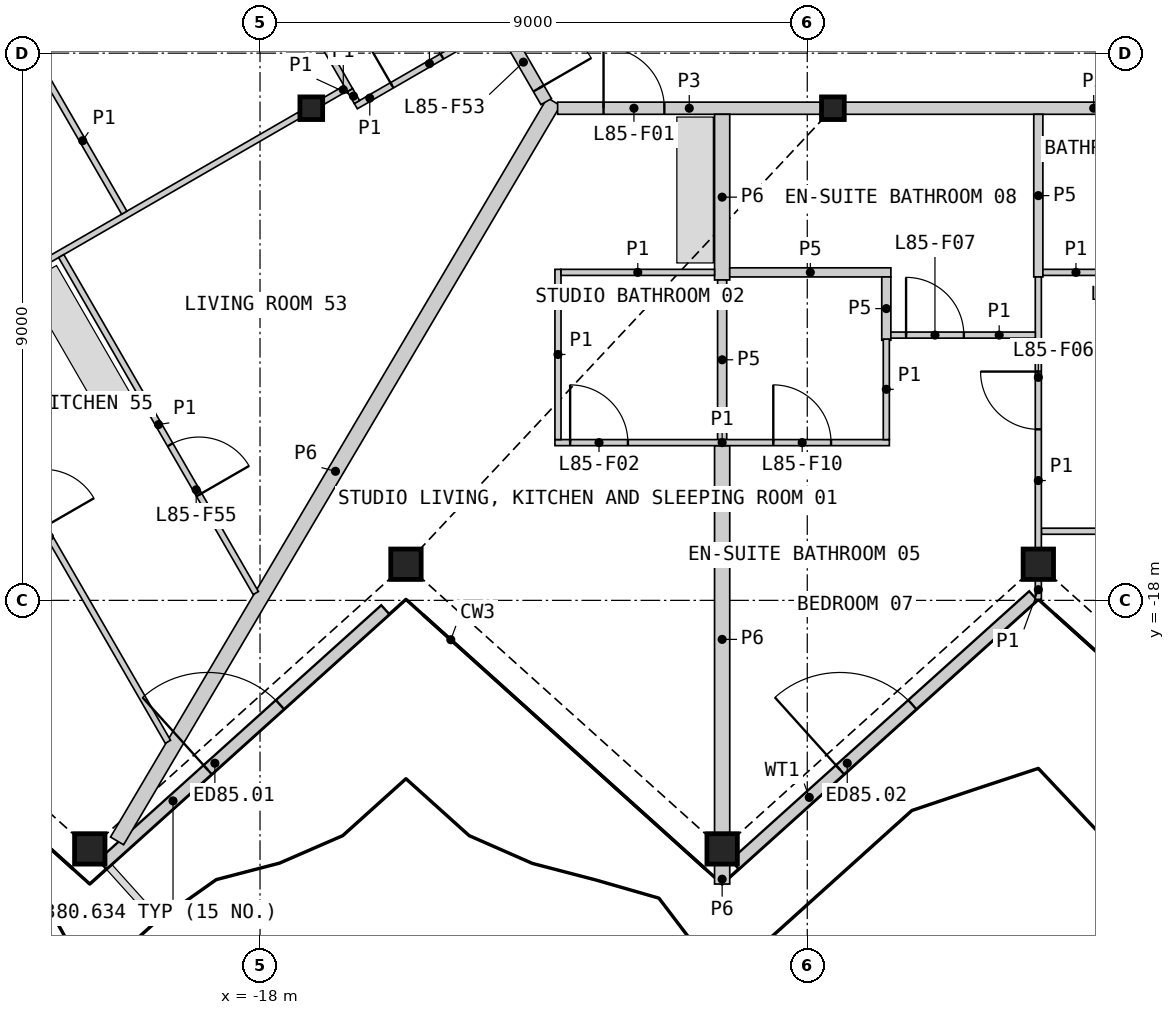
"""IFC4 building model, lengths in metres.
Left out: names, types, materials, properties, quantities, classifications, styles, units other than length and angle.
Written with IfcOpenShell. Run it as: python <this file> out.ifc"""

import sys

from ifc_helpers import new_model, si_unit, direction, frame, frame_2d, origin, origin_2d, place, context, subcontext, project, spatial, rectangle, hollow_rectangle, i_section, extrude, element, fill, save


model = new_model("IFC4")
c1 = context("Model", 3, precision=1e-05, world=origin(), true_north=direction((0.0, 1.0)))
c2 = subcontext(c1, "Body", "Model", "MODEL_VIEW")
j1 = project(units=[si_unit("LENGTHUNIT", "METRE"), si_unit("PLANEANGLEUNIT", "RADIAN")], contexts=[c1])
p1 = place(None, origin())
s1 = spatial("IfcSite", under=j1, at=p1, CompositionType="ELEMENT")
p2 = place(p1, origin())
s2 = spatial("IfcBuilding", under=s1, at=p2, CompositionType="ELEMENT")
p3 = place(p2, frame((0.0, 0.0, 378.0)))
s3 = spatial("IfcBuildingStorey", under=s2, at=p3, CompositionType="ELEMENT", Elevation=378.0)
for number, where, z_axis, x_axis in (
    (1, (-20.8, -22.088, 0.0), (0.0, 0.0, 1.0), (1.0, 0.0, 0.0)),
    (2, (-15.6, -17.406, 0.0), (0.0, 0.0, 1.0), (1.0, 0.0, 0.0)),
    (3, (-10.4, -22.088, 0.0), (0.0, 0.0, 1.0), (1.0, 0.0, 0.0)),
    (4, (-5.2, -17.406, 0.0), (0.0, 0.0, 1.0), (1.0, 0.0, 0.0)),
):
    element("IfcColumn", number, at=place(p3, frame(where, z_axis=z_axis, x_axis=x_axis)), inside=s3, PredefinedType="COLUMN", context=c2, shape_type="SweptSolid", body=[
        extrude(hollow_rectangle(XDim=0.5, YDim=0.5, WallThickness=0.03, at=origin_2d()), origin(), (0.0, 0.0, 1.0), 3.4),
    ])
for number, where, z_axis, x_axis in (
    (5, (-17.157, -9.906, 0.0), (0.0, 0.0, 1.0), (1.0, 0.0, 0.0)),
    (6, (-8.578, -9.906, 0.0), (0.0, 0.0, 1.0), (1.0, 0.0, 0.0)),
):
    element("IfcColumn", number, at=place(p3, frame(where, z_axis=z_axis, x_axis=x_axis)), inside=s3, PredefinedType="COLUMN", context=c2, shape_type="SweptSolid", body=[
        extrude(i_section(OverallWidth=0.374, OverallDepth=0.372, WebThickness=0.016, FlangeThickness=0.026, at=origin_2d()), origin(), (0.0, 0.0, 1.0), 3.4),
    ])
p4 = place(p3, frame((-20.595, -22.346, 0.0), z_axis=(0.0, 0.0, 1.0), x_axis=(0.743137181878, 0.669139095339, 0.0)))
e7 = element("IfcWall", 7, at=p4, inside=s3, PredefinedType="SOLIDWALL", context=c2, shape_type="SweptSolid", body=[
    extrude(rectangle(XDim=6.265, YDim=0.2, at=frame_2d((3.133, 0.0))), origin(), (0.0, 0.0, 1.0), 2.634),
])
p5 = place(p4, frame((2.333, 0.0, 0.0)))
e8 = element("IfcOpeningElement", 8, at=p5, cuts=e7, PredefinedType="OPENING", context=c2, shape_type="SweptSolid", body=[
    extrude(rectangle(XDim=1.6, YDim=2.25, at=frame_2d((0.8, 1.125))), frame((0.0, 0.11, 0.0), z_axis=(0.0, -1.0, 0.0), x_axis=(1.0, 0.0, 0.0)), (0.0, 0.0, 1.0), 0.22),
])
p6 = place(p3, frame((-10.195, -22.346, 0.0), z_axis=(0.0, 0.0, 1.0), x_axis=(0.74313432117, 0.66914227239, 0.0)))
e9 = element("IfcWall", 9, at=p6, inside=s3, PredefinedType="SOLIDWALL", context=c2, shape_type="SweptSolid", body=[
    extrude(rectangle(XDim=6.609, YDim=0.2, at=frame_2d((3.304, 0.0))), origin(), (0.0, 0.0, 1.0), 2.634),
])
p7 = place(p6, frame((2.333, 0.0, 0.0)))
e10 = element("IfcOpeningElement", 10, at=p7, cuts=e9, PredefinedType="OPENING", context=c2, shape_type="SweptSolid", body=[
    extrude(rectangle(XDim=1.6, YDim=2.25, at=frame_2d((0.8, 1.125))), frame((0.0, 0.11, 0.0), z_axis=(0.0, -1.0, 0.0), x_axis=(1.0, 0.0, 0.0)), (0.0, 0.0, 1.0), 0.22),
])
p8 = place(p3, frame((-20.351, -21.956, 0.0), z_axis=(0.0, 0.0, 1.0), x_axis=(0.508713003719, 0.860936164793, 0.0)))
e11 = element("IfcWall", 11, at=p8, inside=s3, PredefinedType="PARTITIONING", context=c2, shape_type="SweptSolid", body=[
    extrude(rectangle(XDim=14.122, YDim=0.25, at=frame_2d((7.061, 0.0))), origin(), (0.0, 0.0, 1.0), 2.33),
])
p9 = place(p3, frame((-8.382, -9.906, 0.0), z_axis=(0.0, 0.0, 1.0), x_axis=(1.0, 0.0, 0.0)))
e12 = element("IfcWall", 12, at=p9, inside=s3, PredefinedType="PARTITIONING", context=c2, shape_type="SweptSolid", body=[
    extrude(rectangle(XDim=8.185, YDim=0.2, at=frame_2d((4.092, 0.0))), origin(), (0.0, 0.0, 1.0), 3.1),
])
p10 = place(p9, frame((6.023, 0.0, 0.0)))
e13 = element("IfcOpeningElement", 13, at=p10, cuts=e12, PredefinedType="OPENING", context=c2, shape_type="SweptSolid", body=[
    extrude(rectangle(XDim=1.0, YDim=2.1, at=frame_2d((0.5, 1.05))), frame((0.0, 0.11, 0.0), z_axis=(0.0, -1.0, 0.0), x_axis=(1.0, 0.0, 0.0)), (0.0, 0.0, 1.0), 0.22),
])
p11 = place(p3, frame((-10.4, -21.828, 0.0), z_axis=(0.0, 0.0, 1.0), x_axis=(0.0, 1.0, 0.0)))
e14 = element("IfcWall", 14, at=p11, inside=s3, PredefinedType="PARTITIONING", context=c2, shape_type="SweptSolid", body=[
    extrude(rectangle(XDim=6.372, YDim=0.25, at=frame_2d((3.186, 0.0))), origin(), (0.0, 0.0, 1.0), 2.33),
])
p12 = place(p3, frame((-13.106, -9.906, 0.0), z_axis=(0.0, 0.0, 1.0), x_axis=(1.0, 0.0, 0.0)))
e15 = element("IfcWall", 15, at=p12, inside=s3, PredefinedType="PARTITIONING", context=c2, shape_type="SweptSolid", body=[
    extrude(rectangle(XDim=4.331, YDim=0.2, at=frame_2d((2.165, 0.0))), origin(), (0.0, 0.0, 1.0), 3.1),
])
p13 = place(p12, frame((0.755, 0.0, 0.0)))
e16 = element("IfcOpeningElement", 16, at=p13, cuts=e15, PredefinedType="OPENING", context=c2, shape_type="SweptSolid", body=[
    extrude(rectangle(XDim=1.0, YDim=2.1, at=frame_2d((0.5, 1.05))), frame((0.0, 0.11, 0.0), z_axis=(0.0, -1.0, 0.0), x_axis=(1.0, 0.0, 0.0)), (0.0, 0.0, 1.0), 0.22),
])
p14 = place(p3, frame((-15.131, -6.614, 0.0), z_axis=(0.0, 0.0, 1.0), x_axis=(0.499967746641, -0.866044024469, 0.0)))
e17 = element("IfcWall", 17, at=p14, inside=s3, PredefinedType="PARTITIONING", context=c2, shape_type="SweptSolid", body=[
    extrude(rectangle(XDim=3.676, YDim=0.2, at=frame_2d((1.838, 0.0))), origin(), (0.0, 0.0, 1.0), 3.1),
])
p15 = place(p14, frame((2.426, 0.0, 0.0)))
e18 = element("IfcOpeningElement", 18, at=p15, cuts=e17, PredefinedType="OPENING", context=c2, shape_type="SweptSolid", body=[
    extrude(rectangle(XDim=1.0, YDim=2.1, at=frame_2d((0.5, 1.05))), frame((0.0, 0.11, 0.0), z_axis=(0.0, -1.0, 0.0), x_axis=(1.0, 0.0, 0.0)), (0.0, 0.0, 1.0), 0.22),
])
p16 = place(p3, frame((-10.4, -12.731, 0.0), z_axis=(0.0, 0.0, 1.0), x_axis=(0.0, 1.0, 0.0)))
e19 = element("IfcWall", 19, at=p16, inside=s3, PredefinedType="PARTITIONING", context=c2, shape_type="SweptSolid", body=[
    extrude(rectangle(XDim=2.725, YDim=0.25, at=frame_2d((1.363, 0.0))), origin(), (0.0, 0.0, 1.0), 2.33),
])
p17 = place(p3, frame((-10.4, -22.666, 0.0), z_axis=(0.0, 0.0, 1.0), x_axis=(0.0, 1.0, 0.0)))
e20 = element("IfcWall", 20, at=p17, inside=s3, PredefinedType="PARTITIONING", context=c2, shape_type="SweptSolid", body=[
    extrude(rectangle(XDim=0.318, YDim=0.25, at=frame_2d((0.159, 0.0))), origin(), (0.0, 0.0, 1.0), 2.33),
])
p18 = place(p3, frame((-10.4, -15.356, 0.0), z_axis=(0.0, 0.0, 1.0), x_axis=(0.0, 1.0, 0.0)))
e21 = element("IfcWall", 21, at=p18, inside=s3, PredefinedType="PLUMBINGWALL", context=c2, shape_type="SweptSolid", body=[
    extrude(rectangle(XDim=2.625, YDim=0.15, at=frame_2d((1.312, 0.0))), origin(), (0.0, 0.0, 1.0), 2.33),
])
p19 = place(p3, frame((-5.2, -12.681, 0.0), z_axis=(0.0, 0.0, 1.0), x_axis=(0.0, 1.0, 0.0)))
e22 = element("IfcWall", 22, at=p19, inside=s3, PredefinedType="PLUMBINGWALL", context=c2, shape_type="SweptSolid", body=[
    extrude(rectangle(XDim=2.675, YDim=0.15, at=frame_2d((1.337, 0.0))), origin(), (0.0, 0.0, 1.0), 2.33),
])
p20 = place(p3, frame((-10.275, -12.606, 0.0), z_axis=(0.0, 0.0, 1.0), x_axis=(1.0, 0.0, 0.0)))
e23 = element("IfcWall", 23, at=p20, inside=s3, PredefinedType="PLUMBINGWALL", context=c2, shape_type="SweptSolid", body=[
    extrude(rectangle(XDim=2.65, YDim=0.15, at=frame_2d((1.325, 0.0))), origin(), (0.0, 0.0, 1.0), 2.33),
])
p21 = place(p3, frame((-7.7, -13.722, 0.0), z_axis=(0.0, 0.0, 1.0), x_axis=(0.0, 1.0, 0.0)))
e24 = element("IfcWall", 24, at=p21, inside=s3, PredefinedType="PLUMBINGWALL", context=c2, shape_type="SweptSolid", body=[
    extrude(rectangle(XDim=1.042, YDim=0.15, at=frame_2d((0.521, 0.0))), origin(), (0.0, 0.0, 1.0), 2.33),
])
p22 = place(p3, frame((-26.777, -15.46, 0.0), z_axis=(0.0, 0.0, 1.0), x_axis=(0.866019680922, 0.500009912158, 0.0)))
e25 = element("IfcWall", 25, at=p22, inside=s3, PredefinedType="PARTITIONING", context=c2, shape_type="SweptSolid", body=[
    extrude(rectangle(XDim=10.881, YDim=0.1, at=frame_2d((5.44, 0.0))), origin(), (0.0, 0.0, 1.0), 2.33),
])
p23 = place(p22, frame((1.454, 0.0, 0.0)))
e26 = element("IfcOpeningElement", 26, at=p23, cuts=e25, PredefinedType="OPENING", context=c2, shape_type="SweptSolid", body=[
    extrude(rectangle(XDim=0.95, YDim=2.1, at=frame_2d((0.475, 1.05))), frame((0.0, 0.06, 0.0), z_axis=(0.0, -1.0, 0.0), x_axis=(1.0, 0.0, 0.0)), (0.0, 0.0, 1.0), 0.12),
])
p24 = place(p3, frame((-23.413, -13.575, 0.0), z_axis=(0.0, 0.0, 1.0), x_axis=(0.499998958472, -0.86602600511, 0.0)))
e27 = element("IfcWall", 27, at=p24, inside=s3, PredefinedType="PARTITIONING", context=c2, shape_type="SweptSolid", body=[
    extrude(rectangle(XDim=7.796, YDim=0.1, at=frame_2d((3.898, 0.0))), origin(), (0.0, 0.0, 1.0), 2.33),
])
p25 = place(p24, frame((2.768, 0.0, 0.0)))
e28 = element("IfcOpeningElement", 28, at=p25, cuts=e27, PredefinedType="OPENING", context=c2, shape_type="SweptSolid", body=[
    extrude(rectangle(XDim=0.95, YDim=2.1, at=frame_2d((0.475, 1.05))), frame((0.0, 0.06, 0.0), z_axis=(0.0, -1.0, 0.0), x_axis=(1.0, 0.0, 0.0)), (0.0, 0.0, 1.0), 0.12),
])
p26 = place(p3, frame((-21.269, -12.337, 0.0), z_axis=(0.0, 0.0, 1.0), x_axis=(0.499983315828, -0.866035036182, 0.0)))
e29 = element("IfcWall", 29, at=p26, inside=s3, PredefinedType="PARTITIONING", context=c2, shape_type="SweptSolid", body=[
    extrude(rectangle(XDim=6.4, YDim=0.1, at=frame_2d((3.2, 0.0))), origin(), (0.0, 0.0, 1.0), 2.33),
])
p27 = place(p26, frame((3.584, 0.0, 0.0)))
e30 = element("IfcOpeningElement", 30, at=p27, cuts=e29, PredefinedType="OPENING", context=c2, shape_type="SweptSolid", body=[
    extrude(rectangle(XDim=0.95, YDim=2.1, at=frame_2d((0.475, 1.05))), frame((0.0, 0.06, 0.0), z_axis=(0.0, -1.0, 0.0), x_axis=(1.0, 0.0, 0.0)), (0.0, 0.0, 1.0), 0.12),
])
p28 = place(p3, frame((-13.15, -15.406, 0.0), z_axis=(0.0, 0.0, 1.0), x_axis=(1.0, 0.0, 0.0)))
e31 = element("IfcWall", 31, at=p28, inside=s3, PredefinedType="PARTITIONING", context=c2, shape_type="SweptSolid", body=[
    extrude(rectangle(XDim=5.5, YDim=0.1, at=frame_2d((2.75, 0.0))), origin(), (0.0, 0.0, 1.0), 2.33),
])
p29 = place(p28, frame((0.25, 0.0, 0.0)))
e32 = element("IfcOpeningElement", 32, at=p29, cuts=e31, PredefinedType="OPENING", context=c2, shape_type="SweptSolid", body=[
    extrude(rectangle(XDim=0.95, YDim=2.1, at=frame_2d((0.475, 1.05))), frame((0.0, 0.06, 0.0), z_axis=(0.0, -1.0, 0.0), x_axis=(1.0, 0.0, 0.0)), (0.0, 0.0, 1.0), 0.12),
])
p30 = place(p28, frame((3.591, 0.0, 0.0)))
e33 = element("IfcOpeningElement", 33, at=p30, cuts=e31, PredefinedType="OPENING", context=c2, shape_type="SweptSolid", body=[
    extrude(rectangle(XDim=0.95, YDim=2.1, at=frame_2d((0.475, 1.05))), frame((0.0, 0.06, 0.0), z_axis=(0.0, -1.0, 0.0), x_axis=(1.0, 0.0, 0.0)), (0.0, 0.0, 1.0), 0.12),
])
p31 = place(p3, frame((-5.15, -16.863, 0.0), z_axis=(0.0, 0.0, 1.0), x_axis=(1.0, 0.0, 0.0)))
e34 = element("IfcWall", 34, at=p31, inside=s3, PredefinedType="PARTITIONING", context=c2, shape_type="SweptSolid", body=[
    extrude(rectangle(XDim=5.1, YDim=0.1, at=frame_2d((2.55, 0.0))), origin(), (0.0, 0.0, 1.0), 2.33),
])
p32 = place(p31, frame((2.075, 0.0, 0.0)))
e35 = element("IfcOpeningElement", 35, at=p32, cuts=e34, PredefinedType="OPENING", context=c2, shape_type="SweptSolid", body=[
    extrude(rectangle(XDim=0.95, YDim=2.1, at=frame_2d((0.475, 1.05))), frame((0.0, 0.06, 0.0), z_axis=(0.0, -1.0, 0.0), x_axis=(1.0, 0.0, 0.0)), (0.0, 0.0, 1.0), 0.12),
])
p33 = place(p3, frame((-5.2, -17.146, 0.0), z_axis=(0.0, 0.0, 1.0), x_axis=(0.0, 1.0, 0.0)))
e36 = element("IfcWall", 36, at=p33, inside=s3, PredefinedType="PARTITIONING", context=c2, shape_type="SweptSolid", body=[
    extrude(rectangle(XDim=4.465, YDim=0.1, at=frame_2d((2.232, 0.0))), origin(), (0.0, 0.0, 1.0), 2.33),
])
p34 = place(p33, frame((1.958, 0.0, 0.0)))
e37 = element("IfcOpeningElement", 37, at=p34, cuts=e36, PredefinedType="OPENING", context=c2, shape_type="SweptSolid", body=[
    extrude(rectangle(XDim=0.95, YDim=2.1, at=frame_2d((0.475, 1.05))), frame((0.0, 0.06, 0.0), z_axis=(0.0, -1.0, 0.0), x_axis=(1.0, 0.0, 0.0)), (0.0, 0.0, 1.0), 0.12),
])
p35 = place(p3, frame((-21.6, -9.256, 0.0), z_axis=(0.0, 0.0, 1.0), x_axis=(0.500018733116, -0.866014587945, 0.0)))
e38 = element("IfcWall", 38, at=p35, inside=s3, PredefinedType="PARTITIONING", context=c2, shape_type="SweptSolid", body=[
    extrude(rectangle(XDim=2.734, YDim=0.1, at=frame_2d((1.367, 0.0))), origin(), (0.0, 0.0, 1.0), 2.33),
])
p36 = place(p3, frame((-13.1, -15.356, 0.0), z_axis=(0.0, 0.0, 1.0), x_axis=(0.0, 1.0, 0.0)))
e39 = element("IfcWall", 39, at=p36, inside=s3, PredefinedType="PARTITIONING", context=c2, shape_type="SweptSolid", body=[
    extrude(rectangle(XDim=2.8, YDim=0.1, at=frame_2d((1.4, 0.0))), origin(), (0.0, 0.0, 1.0), 2.33),
])
p37 = place(p3, frame((-13.05, -12.606, 0.0), z_axis=(0.0, 0.0, 1.0), x_axis=(1.0, 0.0, 0.0)))
e40 = element("IfcWall", 40, at=p37, inside=s3, PredefinedType="PARTITIONING", context=c2, shape_type="SweptSolid", body=[
    extrude(rectangle(XDim=2.525, YDim=0.1, at=frame_2d((1.263, 0.0))), origin(), (0.0, 0.0, 1.0), 2.33),
])
p38 = place(p3, frame((-16.425, -9.872, 0.0), z_axis=(0.0, 0.0, 1.0), x_axis=(0.86603978909, 0.499975083092, 0.0)))
e41 = element("IfcWall", 41, at=p38, inside=s3, PredefinedType="PARTITIONING", context=c2, shape_type="SweptSolid", body=[
    extrude(rectangle(XDim=2.649, YDim=0.1, at=frame_2d((1.325, 0.0))), origin(), (0.0, 0.0, 1.0), 2.33),
])
p39 = place(p38, frame((0.686, 0.0, 0.0)))
e42 = element("IfcOpeningElement", 42, at=p39, cuts=e41, PredefinedType="OPENING", context=c2, shape_type="SweptSolid", body=[
    extrude(rectangle(XDim=0.95, YDim=2.1, at=frame_2d((0.475, 1.05))), frame((0.0, 0.06, 0.0), z_axis=(0.0, -1.0, 0.0), x_axis=(1.0, 0.0, 0.0)), (0.0, 0.0, 1.0), 0.12),
])
p40 = place(p3, frame((-7.625, -13.637, 0.0), z_axis=(0.0, 0.0, 1.0), x_axis=(1.0, 0.0, 0.0)))
e43 = element("IfcWall", 43, at=p40, inside=s3, PredefinedType="PARTITIONING", context=c2, shape_type="SweptSolid", body=[
    extrude(rectangle(XDim=2.375, YDim=0.1, at=frame_2d((1.188, 0.0))), origin(), (0.0, 0.0, 1.0), 2.33),
])
p41 = place(p40, frame((0.25, 0.0, 0.0)))
e44 = element("IfcOpeningElement", 44, at=p41, cuts=e43, PredefinedType="OPENING", context=c2, shape_type="SweptSolid", body=[
    extrude(rectangle(XDim=0.95, YDim=2.1, at=frame_2d((0.475, 1.05))), frame((0.0, 0.06, 0.0), z_axis=(0.0, -1.0, 0.0), x_axis=(1.0, 0.0, 0.0)), (0.0, 0.0, 1.0), 0.12),
])
p42 = place(p3, frame((-5.125, -12.606, 0.0), z_axis=(0.0, 0.0, 1.0), x_axis=(1.0, 0.0, 0.0)))
e45 = element("IfcWall", 45, at=p42, inside=s3, PredefinedType="PARTITIONING", context=c2, shape_type="SweptSolid", body=[
    extrude(rectangle(XDim=2.175, YDim=0.1, at=frame_2d((1.087, 0.0))), origin(), (0.0, 0.0, 1.0), 2.33),
])
p43 = place(p42, frame((0.975, 0.0, 0.0)))
e46 = element("IfcOpeningElement", 46, at=p43, cuts=e45, PredefinedType="OPENING", context=c2, shape_type="SweptSolid", body=[
    extrude(rectangle(XDim=0.95, YDim=2.1, at=frame_2d((0.475, 1.05))), frame((0.0, 0.06, 0.0), z_axis=(0.0, -1.0, 0.0), x_axis=(1.0, 0.0, 0.0)), (0.0, 0.0, 1.0), 0.12),
])
p44 = place(p3, frame((-17.507, -7.899, 0.0), z_axis=(0.0, 0.0, 1.0), x_axis=(0.500011643316, -0.866018681408, 0.0)))
e47 = element("IfcWall", 47, at=p44, inside=s3, PredefinedType="PARTITIONING", context=c2, shape_type="SweptSolid", body=[
    extrude(rectangle(XDim=1.973, YDim=0.1, at=frame_2d((0.987, 0.0))), origin(), (0.0, 0.0, 1.0), 2.33),
])
p45 = place(p3, frame((-7.7, -15.356, 0.0), z_axis=(0.0, 0.0, 1.0), x_axis=(0.0, 1.0, 0.0)))
e48 = element("IfcWall", 48, at=p45, inside=s3, PredefinedType="PARTITIONING", context=c2, shape_type="SweptSolid", body=[
    extrude(rectangle(XDim=1.654, YDim=0.1, at=frame_2d((0.827, 0.0))), origin(), (0.0, 0.0, 1.0), 2.33),
])
p46 = place(p3, frame((-16.96, -9.792, 0.0), z_axis=(0.0, 0.0, 1.0), x_axis=(0.866137484628, 0.499805820016, 0.0)))
e49 = element("IfcWall", 49, at=p46, inside=s3, PredefinedType="PARTITIONING", context=c2, shape_type="SweptSolid", body=[
    extrude(rectangle(XDim=0.423, YDim=0.1, at=frame_2d((0.211, 0.0))), origin(), (0.0, 0.0, 1.0), 2.33),
])
p47 = place(p3, frame((-5.2, -17.983, 0.0), z_axis=(0.0, 0.0, 1.0), x_axis=(0.0, 1.0, 0.0)))
e50 = element("IfcWall", 50, at=p47, inside=s3, PredefinedType="PARTITIONING", context=c2, shape_type="SweptSolid", body=[
    extrude(rectangle(XDim=0.318, YDim=0.1, at=frame_2d((0.159, 0.0))), origin(), (0.0, 0.0, 1.0), 2.33),
])
p48 = place(p3, frame((-16.519, -9.61, 0.0), z_axis=(0.0, 0.0, 1.0), x_axis=(0.50245032488, -0.864606078528, 0.0)))
e51 = element("IfcWall", 51, at=p48, inside=s3, PredefinedType="PARTITIONING", context=c2, shape_type="SweptSolid", body=[
    extrude(rectangle(XDim=0.224, YDim=0.1, at=frame_2d((0.112, 0.0))), origin(), (0.0, 0.0, 1.0), 2.33),
])
p49 = place(p5, origin())
e52 = element("IfcDoor", 52, at=p49, inside=s3, OperationType="DOUBLE_DOOR_SINGLE_SWING", PredefinedType="DOOR", context=c2, shape_type="SweptSolid", body=[
    extrude(rectangle(XDim=1.6, YDim=2.25, at=frame_2d((0.8, 1.125))), frame((0.0, 0.025, 0.0), z_axis=(0.0, -1.0, 0.0), x_axis=(1.0, 0.0, 0.0)), (0.0, 0.0, 1.0), 0.05),
])
fill(e8, e52)
p50 = place(p7, origin())
e53 = element("IfcDoor", 53, at=p50, inside=s3, OperationType="DOUBLE_DOOR_SINGLE_SWING", PredefinedType="DOOR", context=c2, shape_type="SweptSolid", body=[
    extrude(rectangle(XDim=1.6, YDim=2.25, at=frame_2d((0.8, 1.125))), frame((0.0, 0.025, 0.0), z_axis=(0.0, -1.0, 0.0), x_axis=(1.0, 0.0, 0.0)), (0.0, 0.0, 1.0), 0.05),
])
fill(e10, e53)
p51 = place(p13, origin())
e54 = element("IfcDoor", 54, at=p51, inside=s3, OperationType="SINGLE_SWING_LEFT", PredefinedType="DOOR", context=c2, shape_type="SweptSolid", body=[
    extrude(rectangle(XDim=1.0, YDim=2.1, at=frame_2d((0.5, 1.05))), frame((0.0, 0.025, 0.0), z_axis=(0.0, -1.0, 0.0), x_axis=(1.0, 0.0, 0.0)), (0.0, 0.0, 1.0), 0.05),
])
fill(e16, e54)
p52 = place(p29, origin())
e55 = element("IfcDoor", 55, at=p52, inside=s3, OperationType="SINGLE_SWING_LEFT", PredefinedType="DOOR", context=c2, shape_type="SweptSolid", body=[
    extrude(rectangle(XDim=0.95, YDim=2.1, at=frame_2d((0.475, 1.05))), frame((0.0, 0.025, 0.0), z_axis=(0.0, -1.0, 0.0), x_axis=(1.0, 0.0, 0.0)), (0.0, 0.0, 1.0), 0.05),
])
fill(e32, e55)
p53 = place(p34, origin())
e56 = element("IfcDoor", 56, at=p53, inside=s3, OperationType="SINGLE_SWING_RIGHT", PredefinedType="DOOR", context=c2, shape_type="SweptSolid", body=[
    extrude(rectangle(XDim=0.95, YDim=2.1, at=frame_2d((0.475, 1.05))), frame((0.0, 0.025, 0.0), z_axis=(0.0, -1.0, 0.0), x_axis=(1.0, 0.0, 0.0)), (0.0, 0.0, 1.0), 0.05),
])
fill(e37, e56)
p54 = place(p41, origin())
e57 = element("IfcDoor", 57, at=p54, inside=s3, OperationType="SINGLE_SWING_LEFT", PredefinedType="DOOR", context=c2, shape_type="SweptSolid", body=[
    extrude(rectangle(XDim=0.95, YDim=2.1, at=frame_2d((0.475, 1.05))), frame((0.0, 0.025, 0.0), z_axis=(0.0, -1.0, 0.0), x_axis=(1.0, 0.0, 0.0)), (0.0, 0.0, 1.0), 0.05),
])
fill(e44, e57)
p55 = place(p30, origin())
e58 = element("IfcDoor", 58, at=p55, inside=s3, OperationType="SINGLE_SWING_LEFT", PredefinedType="DOOR", context=c2, shape_type="SweptSolid", body=[
    extrude(rectangle(XDim=0.95, YDim=2.1, at=frame_2d((0.475, 1.05))), frame((0.0, 0.025, 0.0), z_axis=(0.0, -1.0, 0.0), x_axis=(1.0, 0.0, 0.0)), (0.0, 0.0, 1.0), 0.05),
])
fill(e33, e58)
p56 = place(p15, origin())
e59 = element("IfcDoor", 59, at=p56, inside=s3, OperationType="SINGLE_SWING_RIGHT", PredefinedType="DOOR", context=c2, shape_type="SweptSolid", body=[
    extrude(rectangle(XDim=1.0, YDim=2.1, at=frame_2d((0.5, 1.05))), frame((0.0, 0.025, 0.0), z_axis=(0.0, -1.0, 0.0), x_axis=(1.0, 0.0, 0.0)), (0.0, 0.0, 1.0), 0.05),
])
fill(e18, e59)
p57 = place(p39, origin())
e60 = element("IfcDoor", 60, at=p57, inside=s3, OperationType="SINGLE_SWING_LEFT", PredefinedType="DOOR", context=c2, shape_type="SweptSolid", body=[
    extrude(rectangle(XDim=0.95, YDim=2.1, at=frame_2d((0.475, 1.05))), frame((0.0, 0.025, 0.0), z_axis=(0.0, -1.0, 0.0), x_axis=(1.0, 0.0, 0.0)), (0.0, 0.0, 1.0), 0.05),
])
fill(e42, e60)
p58 = place(p27, origin())
e61 = element("IfcDoor", 61, at=p58, inside=s3, OperationType="SINGLE_SWING_RIGHT", PredefinedType="DOOR", context=c2, shape_type="SweptSolid", body=[
    extrude(rectangle(XDim=0.95, YDim=2.1, at=frame_2d((0.475, 1.05))), frame((0.0, 0.025, 0.0), z_axis=(0.0, -1.0, 0.0), x_axis=(1.0, 0.0, 0.0)), (0.0, 0.0, 1.0), 0.05),
])
fill(e30, e61)
save(model, sys.argv[1])
